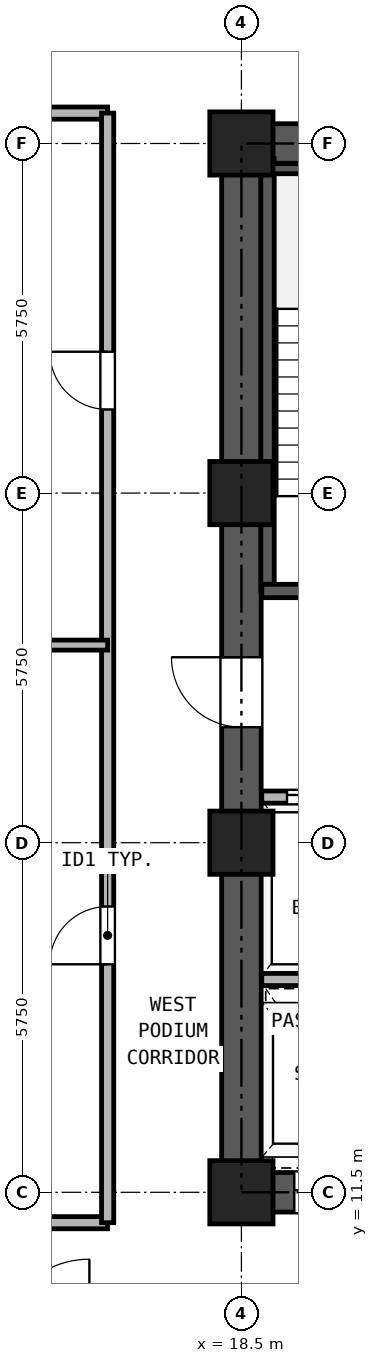
"""IFC4 building model, lengths in metres.
Left out: names, types, materials, properties, quantities, classifications, styles, units other than length and angle.
Written with IfcOpenShell. Run it as: python <this file> out.ifc"""

import sys

from ifc_helpers import new_model, si_unit, direction, frame, frame_2d, origin, origin_2d, place, context, subcontext, project, spatial, rectangle, hollow_rectangle, extrude, source, transform, mapped, element, fill, save


model = new_model("IFC4")
c1 = context("Model", 3, precision=1e-05, world=origin(), true_north=direction((0.0, 1.0)))
c2 = subcontext(c1, "Body", "Model", "MODEL_VIEW")
j1 = project(units=[si_unit("LENGTHUNIT", "METRE"), si_unit("PLANEANGLEUNIT", "RADIAN")], contexts=[c1])
p1 = place(None, origin())
s1 = spatial("IfcSite", under=j1, at=p1, CompositionType="ELEMENT")
p2 = place(p1, origin())
s2 = spatial("IfcBuilding", under=s1, at=p2, CompositionType="ELEMENT")
p3 = place(p2, frame((0.0, 0.0, -4.2)))
s3 = spatial("IfcBuildingStorey", under=s2, at=p3, CompositionType="ELEMENT", Elevation=-4.2)
m1 = source(origin(), c2, "Body", "SweptSolid", [
    extrude(hollow_rectangle(XDim=1.04, YDim=1.04, WallThickness=0.065, at=origin_2d()), origin(), (0.0, 0.0, 1.0), 3.88),
])
for number, where, z_axis, x_axis in (
    (1, (18.5, 11.5, 0.0), (0.0, 0.0, 1.0), (1.0, 0.0, 0.0)),
    (2, (18.5, 17.25, 0.0), (0.0, 0.0, 1.0), (1.0, 0.0, 0.0)),
    (3, (18.5, 23.0, 0.0), (0.0, 0.0, 1.0), (1.0, 0.0, 0.0)),
    (4, (18.5, 28.75, 0.0), (0.0, 0.0, 1.0), (1.0, 0.0, 0.0)),
):
    element("IfcColumn", number, at=place(p3, frame(where, z_axis=z_axis, x_axis=x_axis)), inside=s3, PredefinedType="COLUMN", context=c2, shape_type="MappedRepresentation", body=[
        mapped(m1, transform((0.0, 0.0, 0.0), x_axis=(1.0, 0.0, 0.0), y_axis=(0.0, 1.0, 0.0), z_axis=(0.0, 0.0, 1.0), scale=1.0)),
    ])
p4 = place(p3, frame((18.175, 11.5, 0.0), z_axis=(0.0, 0.0, 1.0), x_axis=(1.0, 0.0, 0.0)))
e5 = element("IfcWall", 5, at=p4, inside=s3, PredefinedType="SHEAR", context=c2, shape_type="SweptSolid", body=[
    extrude(rectangle(XDim=10.65, YDim=0.65, at=frame_2d((5.325, 0.0))), origin(), (0.0, 0.0, 1.0), 3.88),
])
p5 = place(p4, frame((1.195, 0.0, 0.0)))
e6 = element("IfcOpeningElement", 6, at=p5, cuts=e5, PredefinedType="OPENING", context=c2, shape_type="SweptSolid", body=[
    extrude(rectangle(XDim=1.1, YDim=2.25, at=frame_2d((0.55, 1.125))), frame((0.0, 0.335, 0.0), z_axis=(0.0, -1.0, 0.0), x_axis=(1.0, 0.0, 0.0)), (0.0, 0.0, 1.0), 0.67),
])
p6 = place(p4, frame((3.495, 0.0, 0.0)))
e7 = element("IfcOpeningElement", 7, at=p6, cuts=e5, PredefinedType="OPENING", context=c2, shape_type="SweptSolid", body=[
    extrude(rectangle(XDim=1.1, YDim=2.25, at=frame_2d((0.55, 1.125))), frame((0.0, 0.335, 0.0), z_axis=(0.0, -1.0, 0.0), x_axis=(1.0, 0.0, 0.0)), (0.0, 0.0, 1.0), 0.67),
])
p7 = place(p4, frame((5.925, 0.0, 0.0)))
e8 = element("IfcOpeningElement", 8, at=p7, cuts=e5, PredefinedType="OPENING", context=c2, shape_type="SweptSolid", body=[
    extrude(rectangle(XDim=1.05, YDim=2.15, at=frame_2d((0.525, 1.075))), frame((0.0, 0.335, 0.0), z_axis=(0.0, -1.0, 0.0), x_axis=(1.0, 0.0, 0.0)), (0.0, 0.0, 1.0), 0.67),
])
p8 = place(p4, frame((8.325, 0.0, 0.0)))
e9 = element("IfcOpeningElement", 9, at=p8, cuts=e5, PredefinedType="OPENING", context=c2, shape_type="SweptSolid", body=[
    extrude(rectangle(XDim=1.05, YDim=2.15, at=frame_2d((0.525, 1.075))), frame((0.0, 0.335, 0.0), z_axis=(0.0, -1.0, 0.0), x_axis=(1.0, 0.0, 0.0)), (0.0, 0.0, 1.0), 0.67),
])
p9 = place(p3, frame((18.175, 28.75, 0.0), z_axis=(0.0, 0.0, 1.0), x_axis=(1.0, 0.0, 0.0)))
e10 = element("IfcWall", 10, at=p9, inside=s3, PredefinedType="SHEAR", context=c2, shape_type="SweptSolid", body=[
    extrude(rectangle(XDim=10.65, YDim=0.65, at=frame_2d((5.325, 0.0))), origin(), (0.0, 0.0, 1.0), 3.88),
])
p10 = place(p9, frame((4.205, 0.0, 0.0)))
e11 = element("IfcOpeningElement", 11, at=p10, cuts=e10, PredefinedType="OPENING", context=c2, shape_type="SweptSolid", body=[
    extrude(rectangle(XDim=0.9, YDim=2.05, at=frame_2d((0.45, 1.025))), frame((0.0, 0.335, 0.0), z_axis=(0.0, -1.0, 0.0), x_axis=(1.0, 0.0, 0.0)), (0.0, 0.0, 1.0), 0.67),
])
p11 = place(p9, frame((5.745, 0.0, 0.0)))
e12 = element("IfcOpeningElement", 12, at=p11, cuts=e10, PredefinedType="OPENING", context=c2, shape_type="SweptSolid", body=[
    extrude(rectangle(XDim=0.9, YDim=2.05, at=frame_2d((0.45, 1.025))), frame((0.0, 0.335, 0.0), z_axis=(0.0, -1.0, 0.0), x_axis=(1.0, 0.0, 0.0)), (0.0, 0.0, 1.0), 0.67),
])
p12 = place(p3, frame((18.5, 11.825, 0.0), z_axis=(0.0, 0.0, 1.0), x_axis=(0.0, 1.0, 0.0)))
e13 = element("IfcWall", 13, at=p12, inside=s3, PredefinedType="SHEAR", context=c2, shape_type="SweptSolid", body=[
    extrude(rectangle(XDim=16.6, YDim=0.65, at=frame_2d((8.3, 0.0))), origin(), (0.0, 0.0, 1.0), 3.88),
])
p13 = place(p12, frame((7.325, 0.0, 0.0)))
e14 = element("IfcOpeningElement", 14, at=p13, cuts=e13, PredefinedType="OPENING", context=c2, shape_type="SweptSolid", body=[
    extrude(rectangle(XDim=1.15, YDim=2.2, at=frame_2d((0.575, 1.1))), frame((0.0, 0.335, 0.0), z_axis=(0.0, -1.0, 0.0), x_axis=(1.0, 0.0, 0.0)), (0.0, 0.0, 1.0), 0.67),
])
p14 = place(p3, frame((18.93, 21.39, 0.0), z_axis=(0.0, 0.0, 1.0), x_axis=(0.0, 1.0, 0.0)))
e15 = element("IfcWall", 15, at=p14, inside=s3, PredefinedType="SOLIDWALL", context=c2, shape_type="SweptSolid", body=[
    extrude(rectangle(XDim=7.11, YDim=0.22, at=frame_2d((3.555, 0.0))), origin(), (0.0, 0.0, 1.0), 3.88),
])
p15 = place(p3, frame((18.835, 28.335, 0.0), z_axis=(0.0, 0.0, 1.0), x_axis=(1.0, 0.0, 0.0)))
e16 = element("IfcWall", 16, at=p15, inside=s3, PredefinedType="PARTITIONING", context=c2, shape_type="SweptSolid", body=[
    extrude(rectangle(XDim=3.275, YDim=0.165, at=frame_2d((1.638, 0.0))), origin(), (0.0, 0.0, 1.0), 3.88),
])
p16 = place(p3, frame((18.835, 21.39, 0.0), z_axis=(0.0, 0.0, 1.0), x_axis=(1.0, 0.0, 0.0)))
e17 = element("IfcWall", 17, at=p16, inside=s3, PredefinedType="SOLIDWALL", context=c2, shape_type="SweptSolid", body=[
    extrude(rectangle(XDim=6.295, YDim=0.22, at=frame_2d((3.147, 0.0))), origin(), (0.0, 0.0, 1.0), 3.88),
])
p17 = place(p16, frame((1.015, 0.0, 0.0)))
e18 = element("IfcOpeningElement", 18, at=p17, cuts=e17, PredefinedType="OPENING", context=c2, shape_type="SweptSolid", body=[
    extrude(rectangle(XDim=1.15, YDim=2.2, at=frame_2d((0.575, 1.1))), frame((0.0, 0.12, 0.0), z_axis=(0.0, -1.0, 0.0), x_axis=(1.0, 0.0, 0.0)), (0.0, 0.0, 1.0), 0.24),
])
p18 = place(p16, frame((4.745, 0.0, 0.0)))
e19 = element("IfcOpeningElement", 19, at=p18, cuts=e17, PredefinedType="OPENING", context=c2, shape_type="SweptSolid", body=[
    extrude(rectangle(XDim=1.1, YDim=2.25, at=frame_2d((0.55, 1.125))), frame((0.0, 0.12, 0.0), z_axis=(0.0, -1.0, 0.0), x_axis=(1.0, 0.0, 0.0)), (0.0, 0.0, 1.0), 0.24),
])
p19 = place(p3, frame((18.835, 18.0, 0.0), z_axis=(0.0, 0.0, 1.0), x_axis=(1.0, 0.0, 0.0)))
e20 = element("IfcWall", 20, at=p19, inside=s3, PredefinedType="PARTITIONING", context=c2, shape_type="SweptSolid", body=[
    extrude(rectangle(XDim=9.33, YDim=0.2, at=frame_2d((4.665, 0.0))), origin(), (0.0, 0.0, 1.0), 3.88),
])
p20 = place(p19, frame((0.415, 0.0, 0.0)))
e21 = element("IfcOpeningElement", 21, at=p20, cuts=e20, PredefinedType="OPENING", context=c2, shape_type="SweptSolid", body=[
    extrude(rectangle(XDim=1.3, YDim=2.3, at=frame_2d((0.65, 1.15))), frame((0.0, 0.11, 0.0), z_axis=(0.0, -1.0, 0.0), x_axis=(1.0, 0.0, 0.0)), (0.0, 0.0, 1.0), 0.22),
])
p21 = place(p19, frame((2.515, 0.0, 0.0)))
e22 = element("IfcOpeningElement", 22, at=p21, cuts=e20, PredefinedType="OPENING", context=c2, shape_type="SweptSolid", body=[
    extrude(rectangle(XDim=1.3, YDim=2.3, at=frame_2d((0.65, 1.15))), frame((0.0, 0.11, 0.0), z_axis=(0.0, -1.0, 0.0), x_axis=(1.0, 0.0, 0.0)), (0.0, 0.0, 1.0), 0.22),
])
p22 = place(p19, frame((7.015, 0.0, 0.0)))
e23 = element("IfcOpeningElement", 23, at=p22, cuts=e20, PredefinedType="OPENING", context=c2, shape_type="SweptSolid", body=[
    extrude(rectangle(XDim=1.0, YDim=2.15, at=frame_2d((0.5, 1.075))), frame((0.0, 0.11, 0.0), z_axis=(0.0, -1.0, 0.0), x_axis=(1.0, 0.0, 0.0)), (0.0, 0.0, 1.0), 0.22),
])
p23 = place(p3, frame((18.835, 15.0, 0.0), z_axis=(0.0, 0.0, 1.0), x_axis=(1.0, 0.0, 0.0)))
e24 = element("IfcWall", 24, at=p23, inside=s3, PredefinedType="PARTITIONING", context=c2, shape_type="SweptSolid", body=[
    extrude(rectangle(XDim=9.33, YDim=0.2, at=frame_2d((4.665, 0.0))), origin(), (0.0, 0.0, 1.0), 3.88),
])
for number, where, z_axis, x_axis in (
    (25, (7.5, 11.0, 0.0), (0.0, 0.0, 1.0), (1.0, 0.0, 0.0)),
    (26, (7.5, 29.25, 0.0), (0.0, 0.0, 1.0), (1.0, 0.0, 0.0)),
):
    element("IfcWall", number, at=place(p3, frame(where, z_axis=z_axis, x_axis=x_axis)), inside=s3, PredefinedType="PARTITIONING", context=c2, shape_type="SweptSolid", body=[
        extrude(rectangle(XDim=8.8, YDim=0.2, at=frame_2d((4.4, 0.0))), origin(), (0.0, 0.0, 1.0), 3.88),
    ])
p24 = place(p3, frame((16.3, 11.0, 0.0), z_axis=(0.0, 0.0, 1.0), x_axis=(0.0, 1.0, 0.0)))
e27 = element("IfcWall", 27, at=p24, inside=s3, PredefinedType="PARTITIONING", context=c2, shape_type="SweptSolid", body=[
    extrude(rectangle(XDim=18.25, YDim=0.2, at=frame_2d((9.125, 0.0))), origin(), (0.0, 0.0, 1.0), 3.88),
])
p25 = place(p24, frame((4.25, 0.0, 0.0)))
e28 = element("IfcOpeningElement", 28, at=p25, cuts=e27, PredefinedType="OPENING", context=c2, shape_type="SweptSolid", body=[
    extrude(rectangle(XDim=0.95, YDim=2.15, at=frame_2d((0.475, 1.075))), frame((0.0, 0.11, 0.0), z_axis=(0.0, -1.0, 0.0), x_axis=(1.0, 0.0, 0.0)), (0.0, 0.0, 1.0), 0.22),
])
p26 = place(p24, frame((13.375, 0.0, 0.0)))
e29 = element("IfcOpeningElement", 29, at=p26, cuts=e27, PredefinedType="OPENING", context=c2, shape_type="SweptSolid", body=[
    extrude(rectangle(XDim=0.95, YDim=2.15, at=frame_2d((0.475, 1.075))), frame((0.0, 0.11, 0.0), z_axis=(0.0, -1.0, 0.0), x_axis=(1.0, 0.0, 0.0)), (0.0, 0.0, 1.0), 0.22),
])
p27 = place(p3, frame((0.25, 20.5, 0.0), z_axis=(0.0, 0.0, 1.0), x_axis=(1.0, 0.0, 0.0)))
e30 = element("IfcWall", 30, at=p27, inside=s3, PredefinedType="PARTITIONING", context=c2, shape_type="SweptSolid", body=[
    extrude(rectangle(XDim=16.05, YDim=0.165, at=frame_2d((8.025, 0.0))), origin(), (0.0, 0.0, 1.0), 3.88),
])
p28 = place(p20, origin())
e31 = element("IfcDoor", 31, at=p28, inside=s3, OperationType="DOUBLE_DOOR_SLIDING", PredefinedType="DOOR", context=c2, shape_type="SweptSolid", body=[
    extrude(rectangle(XDim=1.3, YDim=2.3, at=frame_2d((0.65, 1.15))), frame((0.0, 0.025, 0.0), z_axis=(0.0, -1.0, 0.0), x_axis=(1.0, 0.0, 0.0)), (0.0, 0.0, 1.0), 0.05),
])
fill(e21, e31)
p29 = place(p13, frame((1.15, 0.0, 0.0), z_axis=(0.0, 0.0, 1.0), x_axis=(-1.0, 0.0, 0.0)))
e32 = element("IfcDoor", 32, at=p29, inside=s3, OperationType="SINGLE_SWING_RIGHT", PredefinedType="DOOR", context=c2, shape_type="SweptSolid", body=[
    extrude(rectangle(XDim=1.15, YDim=2.2, at=frame_2d((0.575, 1.1))), frame((0.0, 0.025, 0.0), z_axis=(0.0, -1.0, 0.0), x_axis=(1.0, 0.0, 0.0)), (0.0, 0.0, 1.0), 0.05),
])
fill(e14, e32)
p30 = place(p5, frame((1.1, 0.0, 0.0), z_axis=(0.0, 0.0, 1.0), x_axis=(-1.0, 0.0, 0.0)))
e33 = element("IfcDoor", 33, at=p30, inside=s3, OperationType="DOUBLE_DOOR_SLIDING", PredefinedType="DOOR", context=c2, shape_type="SweptSolid", body=[
    extrude(rectangle(XDim=1.1, YDim=2.25, at=frame_2d((0.55, 1.125))), frame((0.0, 0.025, 0.0), z_axis=(0.0, -1.0, 0.0), x_axis=(1.0, 0.0, 0.0)), (0.0, 0.0, 1.0), 0.05),
])
fill(e6, e33)
p31 = place(p25, frame((0.95, 0.0, 0.0), z_axis=(0.0, 0.0, 1.0), x_axis=(-1.0, 0.0, 0.0)))
e34 = element("IfcDoor", 34, at=p31, inside=s3, OperationType="SINGLE_SWING_LEFT", PredefinedType="DOOR", context=c2, shape_type="SweptSolid", body=[
    extrude(rectangle(XDim=0.95, YDim=2.15, at=frame_2d((0.475, 1.075))), frame((0.0, 0.025, 0.0), z_axis=(0.0, -1.0, 0.0), x_axis=(1.0, 0.0, 0.0)), (0.0, 0.0, 1.0), 0.05),
])
fill(e28, e34)
p32 = place(p26, frame((0.95, 0.0, 0.0), z_axis=(0.0, 0.0, 1.0), x_axis=(-1.0, 0.0, 0.0)))
e35 = element("IfcDoor", 35, at=p32, inside=s3, OperationType="SINGLE_SWING_RIGHT", PredefinedType="DOOR", context=c2, shape_type="SweptSolid", body=[
    extrude(rectangle(XDim=0.95, YDim=2.15, at=frame_2d((0.475, 1.075))), frame((0.0, 0.025, 0.0), z_axis=(0.0, -1.0, 0.0), x_axis=(1.0, 0.0, 0.0)), (0.0, 0.0, 1.0), 0.05),
])
fill(e29, e35)
save(model, sys.argv[1])
